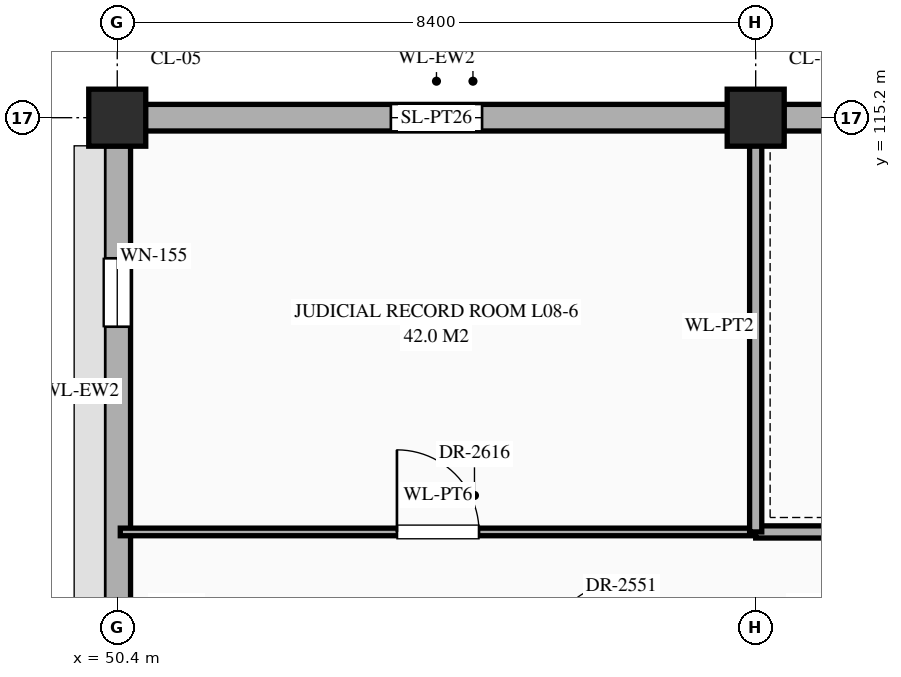
"""IFC4 building model, lengths in metres.
Left out: names, types, materials, properties, quantities, classifications, styles, units other than length and angle.
Written with IfcOpenShell. Run it as: python <this file> out.ifc"""

import sys

from ifc_helpers import new_model, si_unit, direction, frame, frame_2d, origin, origin_2d, place, context, subcontext, project, spatial, rectangle, extrude, element, fill, save


model = new_model("IFC4")
c1 = context("Model", 3, precision=1e-05, world=origin(), true_north=direction((0.0, 1.0)))
c2 = subcontext(c1, "Body", "Model", "MODEL_VIEW")
j1 = project(units=[si_unit("LENGTHUNIT", "METRE"), si_unit("PLANEANGLEUNIT", "RADIAN")], contexts=[c1])
p1 = place(None, origin())
s1 = spatial("IfcSite", under=j1, at=p1, CompositionType="ELEMENT")
p2 = place(p1, origin())
s2 = spatial("IfcBuilding", under=s1, at=p2, CompositionType="ELEMENT")
p3 = place(p2, frame((0.0, 0.0, 35.1)))
s3 = spatial("IfcBuildingStorey", under=s2, at=p3, CompositionType="ELEMENT", Elevation=35.1)
for number, where, z_axis, x_axis in (
    (1, (50.4, 115.2, 0.0), (0.0, 0.0, 1.0), (1.0, 0.0, 0.0)),
    (2, (58.8, 115.2, 0.0), (0.0, 0.0, 1.0), (1.0, 0.0, 0.0)),
):
    element("IfcColumn", number, at=place(p3, frame(where, z_axis=z_axis, x_axis=x_axis)), inside=s3, PredefinedType="COLUMN", context=c2, shape_type="SweptSolid", body=[
        extrude(rectangle(XDim=0.75, YDim=0.75, at=origin_2d()), origin(), (0.0, 0.0, 1.0), 4.2),
    ])
p4 = place(p3, frame((50.77, 115.2, 0.0), z_axis=(0.0, 0.0, 1.0), x_axis=(1.0, 0.0, 0.0)))
e3 = element("IfcWall", 3, at=p4, inside=s3, PredefinedType="STANDARD", context=c2, shape_type="SweptSolid", body=[
    extrude(rectangle(XDim=7.66, YDim=0.35, at=frame_2d((3.83, 0.0))), origin(), (0.0, 0.0, 1.0), 3.3),
])
p5 = place(p4, frame((3.23, 0.0, 0.85)))
e4 = element("IfcOpeningElement", 4, at=p5, cuts=e3, PredefinedType="OPENING", context=c2, shape_type="SweptSolid", body=[
    extrude(rectangle(XDim=1.2, YDim=2.12, at=frame_2d((0.6, 1.06))), frame((0.0, 0.187, 0.0), z_axis=(0.0, -1.0, 0.0), x_axis=(1.0, 0.0, 0.0)), (0.0, 0.0, 1.0), 0.374),
])
p6 = place(p3, frame((50.4, 108.37, 0.0), z_axis=(0.0, 0.0, 1.0), x_axis=(0.0, 1.0, 0.0)))
e5 = element("IfcWall", 5, at=p6, inside=s3, PredefinedType="STANDARD", context=c2, shape_type="SweptSolid", body=[
    extrude(rectangle(XDim=6.46, YDim=0.35, at=frame_2d((3.23, 0.0))), origin(), (0.0, 0.0, 1.0), 3.3),
])
p7 = place(p6, frame((4.08, 0.0, 0.85)))
e6 = element("IfcOpeningElement", 6, at=p7, cuts=e5, PredefinedType="OPENING", context=c2, shape_type="SweptSolid", body=[
    extrude(rectangle(XDim=0.9, YDim=2.12, at=frame_2d((0.45, 1.06))), frame((0.0, 0.187, 0.0), z_axis=(0.0, -1.0, 0.0), x_axis=(1.0, 0.0, 0.0)), (0.0, 0.0, 1.0), 0.374),
])
p8 = place(p3, frame((59.17, 115.2, 0.0), z_axis=(0.0, 0.0, 1.0), x_axis=(1.0, 0.0, 0.0)))
e7 = element("IfcWall", 7, at=p8, inside=s3, PredefinedType="STANDARD", context=c2, shape_type="SweptSolid", body=[
    extrude(rectangle(XDim=7.66, YDim=0.35, at=frame_2d((3.83, 0.0))), origin(), (0.0, 0.0, 1.0), 3.3),
])
p9 = place(p3, frame((50.44, 109.75, 0.0), z_axis=(0.0, 0.0, 1.0), x_axis=(1.0, 0.0, 0.0)))
e8 = element("IfcWall", 8, at=p9, inside=s3, PredefinedType="STANDARD", context=c2, shape_type="SweptSolid", body=[
    extrude(rectangle(XDim=8.36, YDim=0.1, at=frame_2d((4.18, 0.0))), origin(), (0.0, 0.0, 1.0), 3.95),
])
p10 = place(p9, frame((3.64, 0.0, 0.0)))
e9 = element("IfcOpeningElement", 9, at=p10, cuts=e8, PredefinedType="OPENING", context=c2, shape_type="SweptSolid", body=[
    extrude(rectangle(XDim=1.08, YDim=2.25, at=frame_2d((0.54, 1.125))), frame((0.0, 0.062, 0.0), z_axis=(0.0, -1.0, 0.0), x_axis=(1.0, 0.0, 0.0)), (0.0, 0.0, 1.0), 0.124),
])
p11 = place(p3, frame((58.8, 109.75, 0.0), z_axis=(0.0, 0.0, 1.0), x_axis=(1.0, 0.0, 0.0)))
e10 = element("IfcWall", 10, at=p11, inside=s3, PredefinedType="STANDARD", context=c2, shape_type="SweptSolid", body=[
    extrude(rectangle(XDim=16.8, YDim=0.16, at=frame_2d((8.4, 0.0))), origin(), (0.0, 0.0, 1.0), 3.95),
])
p12 = place(p11, frame((7.55, 0.0, 0.0)))
e11 = element("IfcOpeningElement", 11, at=p12, cuts=e10, PredefinedType="OPENING", context=c2, shape_type="SweptSolid", body=[
    extrude(rectangle(XDim=1.7, YDim=2.45, at=frame_2d((0.85, 1.225))), frame((0.0, 0.092, 0.0), z_axis=(0.0, -1.0, 0.0), x_axis=(1.0, 0.0, 0.0)), (0.0, 0.0, 1.0), 0.184),
])
p13 = place(p3, frame((58.8, 109.75, 0.0), z_axis=(0.0, 0.0, 1.0), x_axis=(0.0, 1.0, 0.0)))
e12 = element("IfcWall", 12, at=p13, inside=s3, PredefinedType="STANDARD", context=c2, shape_type="SweptSolid", body=[
    extrude(rectangle(XDim=5.41, YDim=0.16, at=frame_2d((2.705, 0.0))), origin(), (0.0, 0.0, 1.0), 3.2),
])
p14 = place(p5, origin())
e13 = element("IfcWindow", 13, at=p14, inside=s3, PartitioningType="SINGLE_PANEL", PredefinedType="WINDOW", context=c2, shape_type="SweptSolid", body=[
    extrude(rectangle(XDim=1.2, YDim=2.12, at=frame_2d((0.6, 1.06))), frame((0.0, 0.03, 0.0), z_axis=(0.0, -1.0, 0.0), x_axis=(1.0, 0.0, 0.0)), (0.0, 0.0, 1.0), 0.06),
])
fill(e4, e13)
p15 = place(p7, origin())
e14 = element("IfcWindow", 14, at=p15, inside=s3, PartitioningType="SINGLE_PANEL", PredefinedType="WINDOW", context=c2, shape_type="SweptSolid", body=[
    extrude(rectangle(XDim=0.9, YDim=2.12, at=frame_2d((0.45, 1.06))), frame((0.0, 0.03, 0.0), z_axis=(0.0, -1.0, 0.0), x_axis=(1.0, 0.0, 0.0)), (0.0, 0.0, 1.0), 0.06),
])
fill(e6, e14)
p16 = place(p10, origin())
e15 = element("IfcDoor", 15, at=p16, inside=s3, OperationType="SINGLE_SWING_LEFT", PredefinedType="DOOR", context=c2, shape_type="SweptSolid", body=[
    extrude(rectangle(XDim=1.08, YDim=2.25, at=frame_2d((0.54, 1.125))), frame((0.0, 0.025, 0.0), z_axis=(0.0, -1.0, 0.0), x_axis=(1.0, 0.0, 0.0)), (0.0, 0.0, 1.0), 0.05),
])
fill(e9, e15)
save(model, sys.argv[1])
